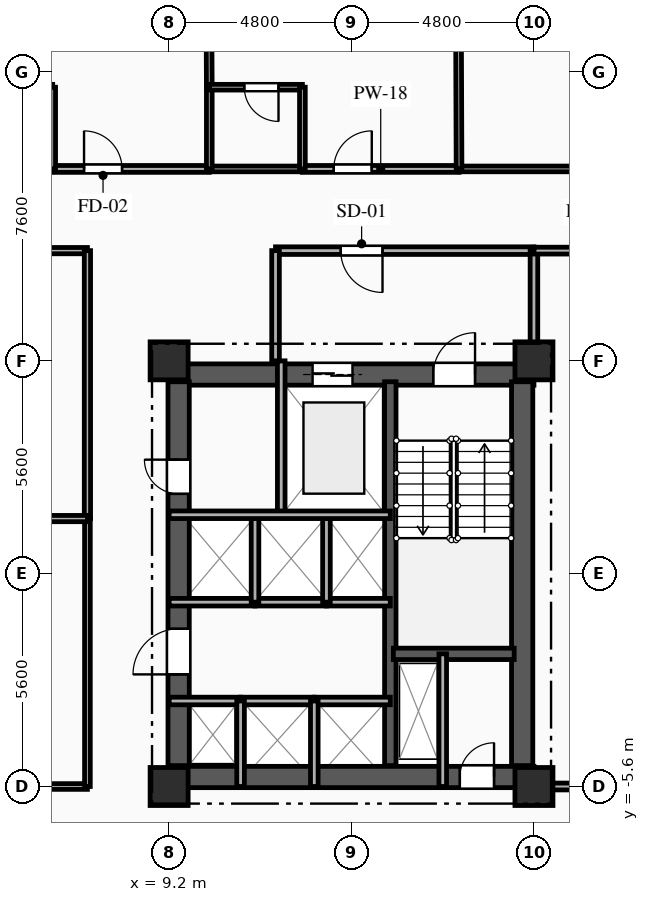
"""IFC4 building model, lengths in metres.
Left out: names, types, materials, properties, quantities, classifications, styles, units other than length and angle.
Written with IfcOpenShell. Run it as: python <this file> out.ifc"""

import sys

from ifc_helpers import new_model, si_unit, direction, frame, frame_2d, origin, origin_2d, place, context, subcontext, project, spatial, rectangle, extrude, element, fill, save


model = new_model("IFC4")
c1 = context("Model", 3, precision=1e-05, world=origin(), true_north=direction((0.0, 1.0)))
c2 = subcontext(c1, "Body", "Model", "MODEL_VIEW")
j1 = project(units=[si_unit("LENGTHUNIT", "METRE"), si_unit("PLANEANGLEUNIT", "RADIAN")], contexts=[c1])
p1 = place(None, origin())
s1 = spatial("IfcSite", under=j1, at=p1, CompositionType="ELEMENT")
p2 = place(p1, origin())
s2 = spatial("IfcBuilding", under=s1, at=p2, CompositionType="ELEMENT")
p3 = place(p2, frame((0.0, 0.0, 82.35)))
s3 = spatial("IfcBuildingStorey", under=s2, at=p3, CompositionType="ELEMENT", Elevation=82.35)
for number, where, z_axis, x_axis in (
    (1, (9.2, -5.6, 0.0), (0.0, 0.0, 1.0), (1.0, 0.0, 0.0)),
    (2, (9.2, 5.6, 0.0), (0.0, 0.0, 1.0), (1.0, 0.0, 0.0)),
    (3, (18.8, -5.6, 0.0), (0.0, 0.0, 1.0), (1.0, 0.0, 0.0)),
    (4, (18.8, 5.6, 0.0), (0.0, 0.0, 1.0), (1.0, 0.0, 0.0)),
):
    element("IfcColumn", number, at=place(p3, frame(where, z_axis=z_axis, x_axis=x_axis)), inside=s3, PredefinedType="COLUMN", context=c2, shape_type="SweptSolid", body=[
        extrude(rectangle(XDim=1.0, YDim=1.0, at=origin_2d()), origin(), (0.0, 0.0, 1.0), 3.35),
    ])
p4 = place(p3, frame((9.2, 5.24, 0.0), z_axis=(0.0, 0.0, 1.0), x_axis=(1.0, 0.0, 0.0)))
e5 = element("IfcWall", 5, at=p4, inside=s3, PredefinedType="SHEAR", context=c2, shape_type="SweptSolid", body=[
    extrude(rectangle(XDim=9.6, YDim=0.56, at=frame_2d((4.8, 0.0))), origin(), (0.0, 0.0, 1.0), 3.045),
])
p5 = place(p4, frame((6.95, 0.0, 0.0)))
e6 = element("IfcOpeningElement", 6, at=p5, cuts=e5, PredefinedType="OPENING", context=c2, shape_type="SweptSolid", body=[
    extrude(rectangle(XDim=1.1, YDim=2.15, at=frame_2d((0.55, 1.075))), frame((0.0, 0.29, 0.0), z_axis=(0.0, -1.0, 0.0), x_axis=(1.0, 0.0, 0.0)), (0.0, 0.0, 1.0), 0.58),
])
p6 = place(p4, frame((3.775, 0.0, 0.0)))
e7 = element("IfcOpeningElement", 7, at=p6, cuts=e5, PredefinedType="OPENING", context=c2, shape_type="SweptSolid", body=[
    extrude(rectangle(XDim=1.05, YDim=2.1, at=frame_2d((0.525, 1.05))), frame((0.0, 0.29, 0.0), z_axis=(0.0, -1.0, 0.0), x_axis=(1.0, 0.0, 0.0)), (0.0, 0.0, 1.0), 0.58),
])
p7 = place(p3, frame((9.2, -5.35, 0.0), z_axis=(0.0, 0.0, 1.0), x_axis=(1.0, 0.0, 0.0)))
e8 = element("IfcWall", 8, at=p7, inside=s3, PredefinedType="SHEAR", context=c2, shape_type="SweptSolid", body=[
    extrude(rectangle(XDim=9.6, YDim=0.56, at=frame_2d((4.8, 0.0))), origin(), (0.0, 0.0, 1.0), 3.045),
])
p8 = place(p7, frame((7.65, 0.0, 0.0)))
e9 = element("IfcOpeningElement", 9, at=p8, cuts=e8, PredefinedType="OPENING", context=c2, shape_type="SweptSolid", body=[
    extrude(rectangle(XDim=0.9, YDim=2.1, at=frame_2d((0.45, 1.05))), frame((0.0, 0.29, 0.0), z_axis=(0.0, -1.0, 0.0), x_axis=(1.0, 0.0, 0.0)), (0.0, 0.0, 1.0), 0.58),
])
p9 = place(p3, frame((9.45, -5.05, 0.0), z_axis=(0.0, 0.0, 1.0), x_axis=(0.0, 1.0, 0.0)))
e10 = element("IfcWall", 10, at=p9, inside=s3, PredefinedType="SHEAR", context=c2, shape_type="SweptSolid", body=[
    extrude(rectangle(XDim=10.1, YDim=0.56, at=frame_2d((5.05, 0.0))), origin(), (0.0, 0.0, 1.0), 3.045),
])
p10 = place(p9, frame((7.15, 0.0, 0.0)))
e11 = element("IfcOpeningElement", 11, at=p10, cuts=e10, PredefinedType="OPENING", context=c2, shape_type="SweptSolid", body=[
    extrude(rectangle(XDim=0.9, YDim=2.1, at=frame_2d((0.45, 1.05))), frame((0.0, 0.29, 0.0), z_axis=(0.0, -1.0, 0.0), x_axis=(1.0, 0.0, 0.0)), (0.0, 0.0, 1.0), 0.58),
])
p11 = place(p9, frame((2.4, 0.0, 0.0)))
e12 = element("IfcOpeningElement", 12, at=p11, cuts=e10, PredefinedType="OPENING", context=c2, shape_type="SweptSolid", body=[
    extrude(rectangle(XDim=1.2, YDim=2.15, at=frame_2d((0.6, 1.075))), frame((0.0, 0.29, 0.0), z_axis=(0.0, -1.0, 0.0), x_axis=(1.0, 0.0, 0.0)), (0.0, 0.0, 1.0), 0.58),
])
p12 = place(p3, frame((18.49, -5.05, 0.0), z_axis=(0.0, 0.0, 1.0), x_axis=(0.0, 1.0, 0.0)))
e13 = element("IfcWall", 13, at=p12, inside=s3, PredefinedType="SHEAR", context=c2, shape_type="SweptSolid", body=[
    extrude(rectangle(XDim=10.1, YDim=0.56, at=frame_2d((5.05, 0.0))), origin(), (0.0, 0.0, 1.0), 3.045),
])
p13 = place(p3, frame((15.02, -5.05, 0.0), z_axis=(0.0, 0.0, 1.0), x_axis=(0.0, 1.0, 0.0)))
e14 = element("IfcWall", 14, at=p13, inside=s3, PredefinedType="SHEAR", context=c2, shape_type="SweptSolid", body=[
    extrude(rectangle(XDim=10.1, YDim=0.3, at=frame_2d((5.05, 0.0))), origin(), (0.0, 0.0, 1.0), 3.045),
])
p14 = place(p3, frame((15.1, -2.11, 0.0), z_axis=(0.0, 0.0, 1.0), x_axis=(1.0, 0.0, 0.0)))
e15 = element("IfcWall", 15, at=p14, inside=s3, PredefinedType="SHEAR", context=c2, shape_type="SweptSolid", body=[
    extrude(rectangle(XDim=3.18, YDim=0.3, at=frame_2d((1.59, 0.0))), origin(), (0.0, 0.0, 1.0), 3.045),
])
p15 = place(p3, frame((16.4, -2.11, 0.0), z_axis=(0.0, 0.0, 1.0), x_axis=(0.0, -1.0, 0.0)))
e16 = element("IfcWall", 16, at=p15, inside=s3, PredefinedType="PARTITIONING", context=c2, shape_type="SweptSolid", body=[
    extrude(rectangle(XDim=3.49, YDim=0.2, at=frame_2d((1.745, 0.0))), origin(), (0.0, 0.0, 1.0), 3.045),
])
p16 = place(p3, frame((12.15, 5.6, 0.0), z_axis=(0.0, 0.0, 1.0), x_axis=(0.0, -1.0, 0.0)))
e17 = element("IfcWall", 17, at=p16, inside=s3, PredefinedType="PARTITIONING", context=c2, shape_type="SweptSolid", body=[
    extrude(rectangle(XDim=4.05, YDim=0.2, at=frame_2d((2.025, 0.0))), origin(), (0.0, 0.0, 1.0), 3.045),
])
p17 = place(p3, frame((18.8, 8.5, 0.0), z_axis=(0.0, 0.0, 1.0), x_axis=(-1.0, 0.0, 0.0)))
e18 = element("IfcWall", 18, at=p17, inside=s3, PredefinedType="PARTITIONING", context=c2, shape_type="SweptSolid", body=[
    extrude(rectangle(XDim=6.8, YDim=0.2, at=frame_2d((3.4, 0.0))), origin(), (0.0, 0.0, 1.0), 3.045),
])
p18 = place(p17, frame((3.985, 0.0, 0.0)))
e19 = element("IfcOpeningElement", 19, at=p18, cuts=e18, PredefinedType="OPENING", context=c2, shape_type="SweptSolid", body=[
    extrude(rectangle(XDim=1.1, YDim=2.15, at=frame_2d((0.55, 1.075))), frame((0.0, 0.11, 0.0), z_axis=(0.0, -1.0, 0.0), x_axis=(1.0, 0.0, 0.0)), (0.0, 0.0, 1.0), 0.22),
])
p19 = place(p3, frame((12.0, 8.5, 0.0), z_axis=(0.0, 0.0, 1.0), x_axis=(0.0, -1.0, 0.0)))
e20 = element("IfcWall", 20, at=p19, inside=s3, PredefinedType="PARTITIONING", context=c2, shape_type="SweptSolid", body=[
    extrude(rectangle(XDim=2.9, YDim=0.2, at=frame_2d((1.45, 0.0))), origin(), (0.0, 0.0, 1.0), 3.045),
])
p20 = place(p3, frame((18.8, 5.6, 0.0), z_axis=(0.0, 0.0, 1.0), x_axis=(0.0, 1.0, 0.0)))
e21 = element("IfcWall", 21, at=p20, inside=s3, PredefinedType="PARTITIONING", context=c2, shape_type="SweptSolid", body=[
    extrude(rectangle(XDim=2.9, YDim=0.2, at=frame_2d((1.45, 0.0))), origin(), (0.0, 0.0, 1.0), 2.53),
])
p21 = place(p3, frame((9.2, -3.35, 0.0), z_axis=(0.0, 0.0, 1.0), x_axis=(1.0, 0.0, 0.0)))
e22 = element("IfcWall", 22, at=p21, inside=s3, PredefinedType="PARTITIONING", context=c2, shape_type="SweptSolid", body=[
    extrude(rectangle(XDim=1.88, YDim=0.2, at=frame_2d((0.94, 0.0))), origin(), (0.0, 0.0, 1.0), 2.76),
])
p22 = place(p3, frame((11.08, -3.35, 0.0), z_axis=(0.0, 0.0, 1.0), x_axis=(1.0, 0.0, 0.0)))
e23 = element("IfcWall", 23, at=p22, inside=s3, PredefinedType="PARTITIONING", context=c2, shape_type="SweptSolid", body=[
    extrude(rectangle(XDim=1.94, YDim=0.2, at=frame_2d((0.97, 0.0))), origin(), (0.0, 0.0, 1.0), 3.045),
])
p23 = place(p3, frame((13.02, -3.35, 0.0), z_axis=(0.0, 0.0, 1.0), x_axis=(1.0, 0.0, 0.0)))
e24 = element("IfcWall", 24, at=p23, inside=s3, PredefinedType="PARTITIONING", context=c2, shape_type="SweptSolid", body=[
    extrude(rectangle(XDim=2.0, YDim=0.2, at=frame_2d((1.0, 0.0))), origin(), (0.0, 0.0, 1.0), 3.045),
])
p24 = place(p3, frame((11.46, -0.75, 0.0), z_axis=(0.0, 0.0, 1.0), x_axis=(-1.0, 0.0, 0.0)))
e25 = element("IfcWall", 25, at=p24, inside=s3, PredefinedType="PARTITIONING", context=c2, shape_type="SweptSolid", body=[
    extrude(rectangle(XDim=2.26, YDim=0.2, at=frame_2d((1.13, 0.0))), origin(), (0.0, 0.0, 1.0), 3.045),
])
p25 = place(p3, frame((13.34, -0.75, 0.0), z_axis=(0.0, 0.0, 1.0), x_axis=(-1.0, 0.0, 0.0)))
e26 = element("IfcWall", 26, at=p25, inside=s3, PredefinedType="PARTITIONING", context=c2, shape_type="SweptSolid", body=[
    extrude(rectangle(XDim=1.88, YDim=0.2, at=frame_2d((0.94, 0.0))), origin(), (0.0, 0.0, 1.0), 3.045),
])
p26 = place(p3, frame((15.02, -0.75, 0.0), z_axis=(0.0, 0.0, 1.0), x_axis=(-1.0, 0.0, 0.0)))
e27 = element("IfcWall", 27, at=p26, inside=s3, PredefinedType="PARTITIONING", context=c2, shape_type="SweptSolid", body=[
    extrude(rectangle(XDim=1.68, YDim=0.2, at=frame_2d((0.84, 0.0))), origin(), (0.0, 0.0, 1.0), 3.045),
])
for number, where, z_axis, x_axis in (
    (28, (11.08, -5.6, 0.0), (0.0, 0.0, 1.0), (0.0, 1.0, 0.0)),
    (29, (13.02, -5.6, 0.0), (0.0, 0.0, 1.0), (0.0, 1.0, 0.0)),
):
    element("IfcWall", number, at=place(p3, frame(where, z_axis=z_axis, x_axis=x_axis)), inside=s3, PredefinedType="PARTITIONING", context=c2, shape_type="SweptSolid", body=[
        extrude(rectangle(XDim=2.25, YDim=0.2, at=frame_2d((1.125, 0.0))), origin(), (0.0, 0.0, 1.0), 3.045),
    ])
for number, where, z_axis, x_axis in (
    (30, (11.46, -0.75, 0.0), (0.0, 0.0, 1.0), (0.0, 1.0, 0.0)),
    (31, (13.34, -0.75, 0.0), (0.0, 0.0, 1.0), (0.0, 1.0, 0.0)),
):
    element("IfcWall", number, at=place(p3, frame(where, z_axis=z_axis, x_axis=x_axis)), inside=s3, PredefinedType="PARTITIONING", context=c2, shape_type="SweptSolid", body=[
        extrude(rectangle(XDim=2.3, YDim=0.2, at=frame_2d((1.15, 0.0))), origin(), (0.0, 0.0, 1.0), 3.045),
    ])
p27 = place(p3, frame((21.45, 8.5, 0.0), z_axis=(0.0, 0.0, 1.0), x_axis=(-1.0, 0.0, 0.0)))
e32 = element("IfcWall", 32, at=p27, inside=s3, PredefinedType="PARTITIONING", context=c2, shape_type="SweptSolid", body=[
    extrude(rectangle(XDim=2.65, YDim=0.18, at=frame_2d((1.325, 0.0))), origin(), (0.0, 0.0, 1.0), 3.045),
])
p28 = place(p27, frame((0.641, 0.0, 0.0)))
e33 = element("IfcOpeningElement", 33, at=p28, cuts=e32, PredefinedType="OPENING", context=c2, shape_type="SweptSolid", body=[
    extrude(rectangle(XDim=1.0, YDim=2.15, at=frame_2d((0.5, 1.075))), frame((0.0, 0.1, 0.0), z_axis=(0.0, -1.0, 0.0), x_axis=(1.0, 0.0, 0.0)), (0.0, 0.0, 1.0), 0.2),
])
p29 = place(p3, frame((6.136, 10.65, 0.0), z_axis=(0.0, 0.0, 1.0), x_axis=(1.0, 0.0, 0.0)))
e34 = element("IfcWall", 34, at=p29, inside=s3, PredefinedType="PARTITIONING", context=c2, shape_type="SweptSolid", body=[
    extrude(rectangle(XDim=4.121, YDim=0.18, at=frame_2d((2.061, 0.0))), origin(), (0.0, 0.0, 1.0), 3.045),
])
p30 = place(p29, frame((0.825, 0.0, 0.0)))
e35 = element("IfcOpeningElement", 35, at=p30, cuts=e34, PredefinedType="OPENING", context=c2, shape_type="SweptSolid", body=[
    extrude(rectangle(XDim=1.0, YDim=2.15, at=frame_2d((0.5, 1.075))), frame((0.0, 0.1, 0.0), z_axis=(0.0, -1.0, 0.0), x_axis=(1.0, 0.0, 0.0)), (0.0, 0.0, 1.0), 0.2),
])
p31 = place(p3, frame((3.686, 10.65, 0.0), z_axis=(0.0, 0.0, 1.0), x_axis=(1.0, 0.0, 0.0)))
e36 = element("IfcWall", 36, at=p31, inside=s3, PredefinedType="PLUMBINGWALL", context=c2, shape_type="SweptSolid", body=[
    extrude(rectangle(XDim=2.45, YDim=0.15, at=frame_2d((1.225, 0.0))), origin(), (0.0, 0.0, 1.0), 3.045),
])
p32 = place(p3, frame((12.707, 10.65, 0.0), z_axis=(0.0, 0.0, 1.0), x_axis=(1.0, 0.0, 0.0)))
e37 = element("IfcWall", 37, at=p32, inside=s3, PredefinedType="PARTITIONING", context=c2, shape_type="SweptSolid", body=[
    extrude(rectangle(XDim=4.122, YDim=0.18, at=frame_2d((2.061, 0.0))), origin(), (0.0, 0.0, 1.0), 3.045),
])
p33 = place(p32, frame((0.825, 0.0, 0.0)))
e38 = element("IfcOpeningElement", 38, at=p33, cuts=e37, PredefinedType="OPENING", context=c2, shape_type="SweptSolid", body=[
    extrude(rectangle(XDim=1.0, YDim=2.15, at=frame_2d((0.5, 1.075))), frame((0.0, 0.1, 0.0), z_axis=(0.0, -1.0, 0.0), x_axis=(1.0, 0.0, 0.0)), (0.0, 0.0, 1.0), 0.2),
])
p34 = place(p3, frame((10.257, 10.65, 0.0), z_axis=(0.0, 0.0, 1.0), x_axis=(1.0, 0.0, 0.0)))
e39 = element("IfcWall", 39, at=p34, inside=s3, PredefinedType="PLUMBINGWALL", context=c2, shape_type="SweptSolid", body=[
    extrude(rectangle(XDim=2.45, YDim=0.15, at=frame_2d((1.225, 0.0))), origin(), (0.0, 0.0, 1.0), 3.045),
])
p35 = place(p3, frame((16.829, 10.65, 0.0), z_axis=(0.0, 0.0, 1.0), x_axis=(1.0, 0.0, 0.0)))
e40 = element("IfcWall", 40, at=p35, inside=s3, PredefinedType="PARTITIONING", context=c2, shape_type="SweptSolid", body=[
    extrude(rectangle(XDim=6.171, YDim=0.15, at=frame_2d((3.085, 0.0))), origin(), (0.0, 0.0, 1.0), 3.045),
])
p36 = place(p35, frame((4.046, 0.0, 0.0)))
e41 = element("IfcOpeningElement", 41, at=p36, cuts=e40, PredefinedType="OPENING", context=c2, shape_type="SweptSolid", body=[
    extrude(rectangle(XDim=1.05, YDim=2.15, at=frame_2d((0.525, 1.075))), frame((0.0, 0.085, 0.0), z_axis=(0.0, -1.0, 0.0), x_axis=(1.0, 0.0, 0.0)), (0.0, 0.0, 1.0), 0.17),
])
p37 = place(p3, frame((7.05, 8.5, 0.0), z_axis=(0.0, 0.0, 1.0), x_axis=(-1.0, 0.0, 0.0)))
e42 = element("IfcWall", 42, at=p37, inside=s3, PredefinedType="PARTITIONING", context=c2, shape_type="SweptSolid", body=[
    extrude(rectangle(XDim=7.05, YDim=0.165, at=frame_2d((3.525, 0.0))), origin(), (0.0, 0.0, 1.0), 3.045),
])
p38 = place(p37, frame((4.728, 0.0, 0.0)))
e43 = element("IfcOpeningElement", 43, at=p38, cuts=e42, PredefinedType="OPENING", context=c2, shape_type="SweptSolid", body=[
    extrude(rectangle(XDim=1.15, YDim=2.15, at=frame_2d((0.575, 1.075))), frame((0.0, 0.093, 0.0), z_axis=(0.0, -1.0, 0.0), x_axis=(1.0, 0.0, 0.0)), (0.0, 0.0, 1.0), 0.185),
])
p39 = place(p3, frame((18.8, -5.6, 0.0), z_axis=(0.0, 0.0, 1.0), x_axis=(1.0, 0.0, 0.0)))
e44 = element("IfcWall", 44, at=p39, inside=s3, PredefinedType="PARTITIONING", context=c2, shape_type="SweptSolid", body=[
    extrude(rectangle(XDim=2.65, YDim=0.18, at=frame_2d((1.325, 0.0))), origin(), (0.0, 0.0, 1.0), 2.53),
])
p40 = place(p3, frame((0.0, -5.6, 0.0), z_axis=(0.0, 0.0, 1.0), x_axis=(1.0, 0.0, 0.0)))
e45 = element("IfcWall", 45, at=p40, inside=s3, PredefinedType="PARTITIONING", context=c2, shape_type="SweptSolid", body=[
    extrude(rectangle(XDim=7.05, YDim=0.15, at=frame_2d((3.525, 0.0))), origin(), (0.0, 0.0, 1.0), 2.53),
])
p41 = place(p40, frame((1.185, 0.0, 0.0)))
e46 = element("IfcOpeningElement", 46, at=p41, cuts=e45, PredefinedType="OPENING", context=c2, shape_type="SweptSolid", body=[
    extrude(rectangle(XDim=1.05, YDim=2.15, at=frame_2d((0.525, 1.075))), frame((0.0, 0.085, 0.0), z_axis=(0.0, -1.0, 0.0), x_axis=(1.0, 0.0, 0.0)), (0.0, 0.0, 1.0), 0.17),
])
p42 = place(p3, frame((7.05, -5.6, 0.0), z_axis=(0.0, 0.0, 1.0), x_axis=(0.0, 1.0, 0.0)))
e47 = element("IfcWall", 47, at=p42, inside=s3, PredefinedType="PARTITIONING", context=c2, shape_type="SweptSolid", body=[
    extrude(rectangle(XDim=7.05, YDim=0.15, at=frame_2d((3.525, 0.0))), origin(), (0.0, 0.0, 1.0), 3.045),
])
p43 = place(p3, frame((7.05, 1.45, 0.0), z_axis=(0.0, 0.0, 1.0), x_axis=(0.0, 1.0, 0.0)))
e48 = element("IfcWall", 48, at=p43, inside=s3, PredefinedType="PARTITIONING", context=c2, shape_type="SweptSolid", body=[
    extrude(rectangle(XDim=7.05, YDim=0.165, at=frame_2d((3.525, 0.0))), origin(), (0.0, 0.0, 1.0), 3.045),
])
p44 = place(p3, frame((6.136, 12.8, 0.0), z_axis=(0.0, 0.0, 1.0), x_axis=(-1.0, 0.0, 0.0)))
e49 = element("IfcWall", 49, at=p44, inside=s3, PredefinedType="PLUMBINGWALL", context=c2, shape_type="SweptSolid", body=[
    extrude(rectangle(XDim=2.45, YDim=0.15, at=frame_2d((1.225, 0.0))), origin(), (0.0, 0.0, 1.0), 3.045),
])
p45 = place(p44, frame((0.921, 0.0, 0.0)))
e50 = element("IfcOpeningElement", 50, at=p45, cuts=e49, PredefinedType="OPENING", context=c2, shape_type="SweptSolid", body=[
    extrude(rectangle(XDim=0.9, YDim=2.1, at=frame_2d((0.45, 1.05))), frame((0.0, 0.085, 0.0), z_axis=(0.0, -1.0, 0.0), x_axis=(1.0, 0.0, 0.0)), (0.0, 0.0, 1.0), 0.17),
])
p46 = place(p3, frame((6.136, 10.65, 0.0), z_axis=(0.0, 0.0, 1.0), x_axis=(0.0, 1.0, 0.0)))
e51 = element("IfcWall", 51, at=p46, inside=s3, PredefinedType="PLUMBINGWALL", context=c2, shape_type="SweptSolid", body=[
    extrude(rectangle(XDim=2.15, YDim=0.15, at=frame_2d((1.075, 0.0))), origin(), (0.0, 0.0, 1.0), 3.045),
])
p47 = place(p3, frame((10.213, 21.508, 0.0), z_axis=(0.0, 0.0, 1.0), x_axis=(0.005046334579, -0.999987267173, 0.0)))
e52 = element("IfcWall", 52, at=p47, inside=s3, PredefinedType="PARTITIONING", context=c2, shape_type="SweptSolid", body=[
    extrude(rectangle(XDim=8.708, YDim=0.15, at=frame_2d((4.354, 0.0))), origin(), (0.0, 0.0, 1.0), 3.045),
])
p48 = place(p3, frame((10.257, 12.8, 0.0), z_axis=(0.0, 0.0, 1.0), x_axis=(0.0, -1.0, 0.0)))
e53 = element("IfcWall", 53, at=p48, inside=s3, PredefinedType="PLUMBINGWALL", context=c2, shape_type="SweptSolid", body=[
    extrude(rectangle(XDim=2.15, YDim=0.15, at=frame_2d((1.075, 0.0))), origin(), (0.0, 0.0, 1.0), 3.045),
])
p49 = place(p3, frame((12.707, 12.8, 0.0), z_axis=(0.0, 0.0, 1.0), x_axis=(-1.0, 0.0, 0.0)))
e54 = element("IfcWall", 54, at=p49, inside=s3, PredefinedType="PLUMBINGWALL", context=c2, shape_type="SweptSolid", body=[
    extrude(rectangle(XDim=2.45, YDim=0.15, at=frame_2d((1.225, 0.0))), origin(), (0.0, 0.0, 1.0), 3.045),
])
p50 = place(p49, frame((0.629, 0.0, 0.0)))
e55 = element("IfcOpeningElement", 55, at=p50, cuts=e54, PredefinedType="OPENING", context=c2, shape_type="SweptSolid", body=[
    extrude(rectangle(XDim=0.9, YDim=2.1, at=frame_2d((0.45, 1.05))), frame((0.0, 0.085, 0.0), z_axis=(0.0, -1.0, 0.0), x_axis=(1.0, 0.0, 0.0)), (0.0, 0.0, 1.0), 0.17),
])
p51 = place(p3, frame((12.707, 10.65, 0.0), z_axis=(0.0, 0.0, 1.0), x_axis=(0.0, 1.0, 0.0)))
e56 = element("IfcWall", 56, at=p51, inside=s3, PredefinedType="PLUMBINGWALL", context=c2, shape_type="SweptSolid", body=[
    extrude(rectangle(XDim=2.15, YDim=0.15, at=frame_2d((1.075, 0.0))), origin(), (0.0, 0.0, 1.0), 3.045),
])
p52 = place(p3, frame((16.785, 22.199, 0.0), z_axis=(0.0, 0.0, 1.0), x_axis=(0.003805067053, -0.999992760706, 0.0)))
e57 = element("IfcWall", 57, at=p52, inside=s3, PredefinedType="PARTITIONING", context=c2, shape_type="SweptSolid", body=[
    extrude(rectangle(XDim=11.549, YDim=0.15, at=frame_2d((5.774, 0.0))), origin(), (0.0, 0.0, 1.0), 3.045),
])
p53 = place(p3, frame((0.0, 1.45, 0.0), z_axis=(0.0, 0.0, 1.0), x_axis=(1.0, 0.0, 0.0)))
e58 = element("IfcWall", 58, at=p53, inside=s3, PredefinedType="PARTITIONING", context=c2, shape_type="SweptSolid", body=[
    extrude(rectangle(XDim=7.05, YDim=0.165, at=frame_2d((3.525, 0.0))), origin(), (0.0, 0.0, 1.0), 3.045),
])
p54 = place(p3, frame((9.2, 1.55, 0.0), z_axis=(0.0, 0.0, 1.0), x_axis=(1.0, 0.0, 0.0)))
e59 = element("IfcWall", 59, at=p54, inside=s3, PredefinedType="PARTITIONING", context=c2, shape_type="SweptSolid", body=[
    extrude(rectangle(XDim=5.82, YDim=0.2, at=frame_2d((2.91, 0.0))), origin(), (0.0, 0.0, 1.0), 3.045),
])
p55 = place(p5, origin())
e60 = element("IfcDoor", 60, at=p55, inside=s3, OperationType="SINGLE_SWING_RIGHT", PredefinedType="DOOR", context=c2, shape_type="SweptSolid", body=[
    extrude(rectangle(XDim=1.1, YDim=2.15, at=frame_2d((0.55, 1.075))), frame((0.0, 0.025, 0.0), z_axis=(0.0, -1.0, 0.0), x_axis=(1.0, 0.0, 0.0)), (0.0, 0.0, 1.0), 0.05),
])
fill(e6, e60)
p56 = place(p6, origin())
e61 = element("IfcDoor", 61, at=p56, inside=s3, OperationType="DOUBLE_DOOR_SLIDING", PredefinedType="DOOR", context=c2, shape_type="SweptSolid", body=[
    extrude(rectangle(XDim=1.05, YDim=2.1, at=frame_2d((0.525, 1.05))), frame((0.0, 0.025, 0.0), z_axis=(0.0, -1.0, 0.0), x_axis=(1.0, 0.0, 0.0)), (0.0, 0.0, 1.0), 0.05),
])
fill(e7, e61)
p57 = place(p8, origin())
e62 = element("IfcDoor", 62, at=p57, inside=s3, OperationType="SINGLE_SWING_RIGHT", PredefinedType="DOOR", context=c2, shape_type="SweptSolid", body=[
    extrude(rectangle(XDim=0.9, YDim=2.1, at=frame_2d((0.45, 1.05))), frame((0.0, 0.025, 0.0), z_axis=(0.0, -1.0, 0.0), x_axis=(1.0, 0.0, 0.0)), (0.0, 0.0, 1.0), 0.05),
])
fill(e9, e62)
p58 = place(p18, origin())
e63 = element("IfcDoor", 63, at=p58, inside=s3, OperationType="SINGLE_SWING_LEFT", PredefinedType="DOOR", context=c2, shape_type="SweptSolid", body=[
    extrude(rectangle(XDim=1.1, YDim=2.15, at=frame_2d((0.55, 1.075))), frame((0.0, 0.025, 0.0), z_axis=(0.0, -1.0, 0.0), x_axis=(1.0, 0.0, 0.0)), (0.0, 0.0, 1.0), 0.05),
])
fill(e19, e63)
p59 = place(p10, origin())
e64 = element("IfcDoor", 64, at=p59, inside=s3, OperationType="SINGLE_SWING_RIGHT", PredefinedType="DOOR", context=c2, shape_type="SweptSolid", body=[
    extrude(rectangle(XDim=0.9, YDim=2.1, at=frame_2d((0.45, 1.05))), frame((0.0, 0.025, 0.0), z_axis=(0.0, -1.0, 0.0), x_axis=(1.0, 0.0, 0.0)), (0.0, 0.0, 1.0), 0.05),
])
fill(e11, e64)
p60 = place(p11, origin())
e65 = element("IfcDoor", 65, at=p60, inside=s3, OperationType="SINGLE_SWING_LEFT", PredefinedType="DOOR", context=c2, shape_type="SweptSolid", body=[
    extrude(rectangle(XDim=1.2, YDim=2.15, at=frame_2d((0.6, 1.075))), frame((0.0, 0.025, 0.0), z_axis=(0.0, -1.0, 0.0), x_axis=(1.0, 0.0, 0.0)), (0.0, 0.0, 1.0), 0.05),
])
fill(e12, e65)
p61 = place(p30, origin())
e66 = element("IfcDoor", 66, at=p61, inside=s3, OperationType="SINGLE_SWING_LEFT", PredefinedType="DOOR", context=c2, shape_type="SweptSolid", body=[
    extrude(rectangle(XDim=1.0, YDim=2.15, at=frame_2d((0.5, 1.075))), frame((0.0, 0.025, 0.0), z_axis=(0.0, -1.0, 0.0), x_axis=(1.0, 0.0, 0.0)), (0.0, 0.0, 1.0), 0.05),
])
fill(e35, e66)
p62 = place(p33, origin())
e67 = element("IfcDoor", 67, at=p62, inside=s3, OperationType="SINGLE_SWING_RIGHT", PredefinedType="DOOR", context=c2, shape_type="SweptSolid", body=[
    extrude(rectangle(XDim=1.0, YDim=2.15, at=frame_2d((0.5, 1.075))), frame((0.0, 0.025, 0.0), z_axis=(0.0, -1.0, 0.0), x_axis=(1.0, 0.0, 0.0)), (0.0, 0.0, 1.0), 0.05),
])
fill(e38, e67)
p63 = place(p50, origin())
e68 = element("IfcDoor", 68, at=p63, inside=s3, OperationType="SINGLE_SWING_LEFT", PredefinedType="DOOR", context=c2, shape_type="SweptSolid", body=[
    extrude(rectangle(XDim=0.9, YDim=2.1, at=frame_2d((0.45, 1.05))), frame((0.0, 0.025, 0.0), z_axis=(0.0, -1.0, 0.0), x_axis=(1.0, 0.0, 0.0)), (0.0, 0.0, 1.0), 0.05),
])
fill(e55, e68)
save(model, sys.argv[1])
